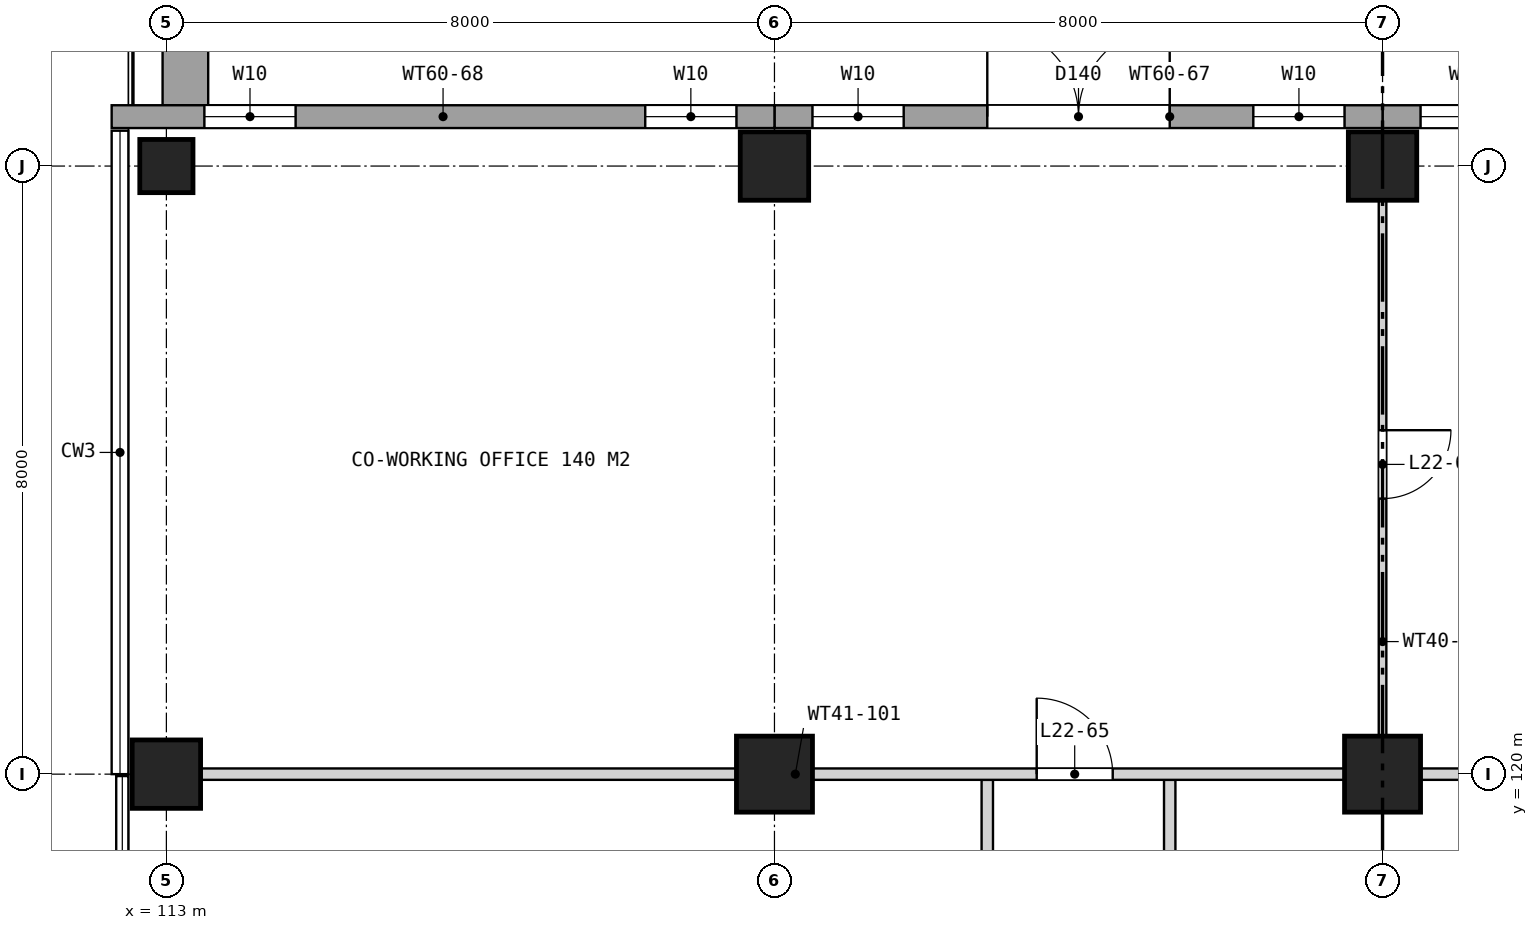
"""IFC4 building model, lengths in metres.
Left out: names, types, materials, properties, quantities, classifications, styles, units other than length and angle.
Written with IfcOpenShell. Run it as: python <this file> out.ifc"""

import sys

from ifc_helpers import new_model, si_unit, direction, frame, frame_2d, origin, origin_2d, place, context, subcontext, project, spatial, rectangle, extrude, element, fill, save


model = new_model("IFC4")
c1 = context("Model", 3, precision=1e-05, world=origin(), true_north=direction((0.0, 1.0)))
c2 = subcontext(c1, "Body", "Model", "MODEL_VIEW")
j1 = project(units=[si_unit("LENGTHUNIT", "METRE"), si_unit("PLANEANGLEUNIT", "RADIAN")], contexts=[c1])
p1 = place(None, origin())
s1 = spatial("IfcSite", under=j1, at=p1, CompositionType="ELEMENT")
p2 = place(p1, origin())
s2 = spatial("IfcBuilding", under=s1, at=p2, CompositionType="ELEMENT")
p3 = place(p2, frame((0.0, 0.0, 112.7)))
s3 = spatial("IfcBuildingStorey", under=s2, at=p3, CompositionType="ELEMENT", Elevation=112.7)
p4 = place(p3, frame((113.0, 120.0, 0.0), z_axis=(0.0, 0.0, 1.0), x_axis=(1.0, 0.0, 0.0)))
e1 = element("IfcColumn", 1, at=p4, inside=s3, PredefinedType="COLUMN", context=c2, shape_type="SweptSolid", body=[
    extrude(rectangle(XDim=0.9, YDim=0.9, at=origin_2d()), origin(), (0.0, 0.0, 1.0), 4.2),
])
p5 = place(p3, frame((113.0, 128.0, 0.0), z_axis=(0.0, 0.0, 1.0), x_axis=(1.0, 0.0, 0.0)))
e2 = element("IfcColumn", 2, at=p5, inside=s3, PredefinedType="COLUMN", context=c2, shape_type="SweptSolid", body=[
    extrude(rectangle(XDim=0.7, YDim=0.7, at=origin_2d()), origin(), (0.0, 0.0, 1.0), 4.2),
])
p6 = place(p3, frame((121.0, 120.0, 0.0), z_axis=(0.0, 0.0, 1.0), x_axis=(1.0, 0.0, 0.0)))
e3 = element("IfcColumn", 3, at=p6, inside=s3, PredefinedType="COLUMN", context=c2, shape_type="SweptSolid", body=[
    extrude(rectangle(XDim=1.0, YDim=1.0, at=origin_2d()), origin(), (0.0, 0.0, 1.0), 4.2),
])
p7 = place(p3, frame((121.0, 128.0, 0.0), z_axis=(0.0, 0.0, 1.0), x_axis=(1.0, 0.0, 0.0)))
e4 = element("IfcColumn", 4, at=p7, inside=s3, PredefinedType="COLUMN", context=c2, shape_type="SweptSolid", body=[
    extrude(rectangle(XDim=0.9, YDim=0.9, at=origin_2d()), origin(), (0.0, 0.0, 1.0), 4.2),
])
p8 = place(p3, frame((129.0, 120.0, 0.0), z_axis=(0.0, 0.0, 1.0), x_axis=(1.0, 0.0, 0.0)))
e5 = element("IfcColumn", 5, at=p8, inside=s3, PredefinedType="COLUMN", context=c2, shape_type="SweptSolid", body=[
    extrude(rectangle(XDim=1.0, YDim=1.0, at=origin_2d()), origin(), (0.0, 0.0, 1.0), 4.2),
])
p9 = place(p3, frame((129.0, 128.0, 0.0), z_axis=(0.0, 0.0, 1.0), x_axis=(1.0, 0.0, 0.0)))
e6 = element("IfcColumn", 6, at=p9, inside=s3, PredefinedType="COLUMN", context=c2, shape_type="SweptSolid", body=[
    extrude(rectangle(XDim=0.9, YDim=0.9, at=origin_2d()), origin(), (0.0, 0.0, 1.0), 4.2),
])
p10 = place(p3, frame((113.25, 128.8, 0.0), z_axis=(0.0, 0.0, 1.0), x_axis=(0.0, 1.0, 0.0)))
e7 = element("IfcWall", 7, at=p10, inside=s3, PredefinedType="SOLIDWALL", context=c2, shape_type="SweptSolid", body=[
    extrude(rectangle(XDim=7.25, YDim=0.6, at=frame_2d((3.625, 0.0))), origin(), (0.0, 0.0, 1.0), 0.6),
])
p11 = place(p3, frame((137.5, 128.65, 0.0), z_axis=(0.0, 0.0, 1.0), x_axis=(-1.0, 0.0, 0.0)))
e8 = element("IfcWall", 8, at=p11, inside=s3, PredefinedType="SOLIDWALL", context=c2, shape_type="SweptSolid", body=[
    extrude(rectangle(XDim=8.5, YDim=0.3, at=frame_2d((4.25, 0.0))), origin(), (0.0, 0.0, 1.0), 3.447),
])
p12 = place(p11, frame((1.0, 0.0, 0.4)))
e9 = element("IfcOpeningElement", 9, at=p12, cuts=e8, PredefinedType="OPENING", context=c2, shape_type="SweptSolid", body=[
    extrude(rectangle(XDim=1.2, YDim=2.2, at=frame_2d((0.6, 1.1))), frame((0.0, 0.16, 0.0), z_axis=(0.0, -1.0, 0.0), x_axis=(1.0, 0.0, 0.0)), (0.0, 0.0, 1.0), 0.32),
])
p13 = place(p11, frame((6.8, 0.0, 0.4)))
e10 = element("IfcOpeningElement", 10, at=p13, cuts=e8, PredefinedType="OPENING", context=c2, shape_type="SweptSolid", body=[
    extrude(rectangle(XDim=1.2, YDim=2.2, at=frame_2d((0.6, 1.1))), frame((0.0, 0.16, 0.0), z_axis=(0.0, -1.0, 0.0), x_axis=(1.0, 0.0, 0.0)), (0.0, 0.0, 1.0), 0.32),
])
p14 = place(p3, frame((129.0, 128.65, 0.0), z_axis=(0.0, 0.0, 1.0), x_axis=(-1.0, 0.0, 0.0)))
e11 = element("IfcWall", 11, at=p14, inside=s3, PredefinedType="SOLIDWALL", context=c2, shape_type="SweptSolid", body=[
    extrude(rectangle(XDim=8.0, YDim=0.3, at=frame_2d((4.0, 0.0))), origin(), (0.0, 0.0, 1.0), 3.447),
])
p15 = place(p14, frame((2.8, 0.0, 0.0)))
e12 = element("IfcOpeningElement", 12, at=p15, cuts=e11, PredefinedType="OPENING", context=c2, shape_type="SweptSolid", body=[
    extrude(rectangle(XDim=2.4, YDim=2.4, at=frame_2d((1.2, 1.2))), frame((0.0, 0.16, 0.0), z_axis=(0.0, -1.0, 0.0), x_axis=(1.0, 0.0, 0.0)), (0.0, 0.0, 1.0), 0.32),
])
p16 = place(p14, frame((0.5, 0.0, 0.4)))
e13 = element("IfcOpeningElement", 13, at=p16, cuts=e11, PredefinedType="OPENING", context=c2, shape_type="SweptSolid", body=[
    extrude(rectangle(XDim=1.2, YDim=2.2, at=frame_2d((0.6, 1.1))), frame((0.0, 0.16, 0.0), z_axis=(0.0, -1.0, 0.0), x_axis=(1.0, 0.0, 0.0)), (0.0, 0.0, 1.0), 0.32),
])
p17 = place(p14, frame((6.3, 0.0, 0.4)))
e14 = element("IfcOpeningElement", 14, at=p17, cuts=e11, PredefinedType="OPENING", context=c2, shape_type="SweptSolid", body=[
    extrude(rectangle(XDim=1.2, YDim=2.2, at=frame_2d((0.6, 1.1))), frame((0.0, 0.16, 0.0), z_axis=(0.0, -1.0, 0.0), x_axis=(1.0, 0.0, 0.0)), (0.0, 0.0, 1.0), 0.32),
])
p18 = place(p3, frame((121.0, 128.65, 0.0), z_axis=(0.0, 0.0, 1.0), x_axis=(-1.0, 0.0, 0.0)))
e15 = element("IfcWall", 15, at=p18, inside=s3, PredefinedType="SOLIDWALL", context=c2, shape_type="SweptSolid", body=[
    extrude(rectangle(XDim=8.72, YDim=0.3, at=frame_2d((4.36, 0.0))), origin(), (0.0, 0.0, 1.0), 3.447),
])
p19 = place(p18, frame((0.5, 0.0, 0.4)))
e16 = element("IfcOpeningElement", 16, at=p19, cuts=e15, PredefinedType="OPENING", context=c2, shape_type="SweptSolid", body=[
    extrude(rectangle(XDim=1.2, YDim=2.2, at=frame_2d((0.6, 1.1))), frame((0.0, 0.16, 0.0), z_axis=(0.0, -1.0, 0.0), x_axis=(1.0, 0.0, 0.0)), (0.0, 0.0, 1.0), 0.32),
])
p20 = place(p18, frame((6.3, 0.0, 0.4)))
e17 = element("IfcOpeningElement", 17, at=p20, cuts=e15, PredefinedType="OPENING", context=c2, shape_type="SweptSolid", body=[
    extrude(rectangle(XDim=1.2, YDim=2.2, at=frame_2d((0.6, 1.1))), frame((0.0, 0.16, 0.0), z_axis=(0.0, -1.0, 0.0), x_axis=(1.0, 0.0, 0.0)), (0.0, 0.0, 1.0), 0.32),
])
p21 = place(p3, frame((123.8, 101.2, 0.0), z_axis=(0.0, 0.0, 1.0), x_axis=(0.0, 1.0, 0.0)))
e18 = element("IfcWall", 18, at=p21, inside=s3, PredefinedType="PARTITIONING", context=c2, shape_type="SweptSolid", body=[
    extrude(rectangle(XDim=18.725, YDim=0.15, at=frame_2d((9.363, 0.0))), origin(), (0.0, 0.0, 1.0), 3.437),
])
p22 = place(p21, frame((0.75, 0.0, 0.0)))
e19 = element("IfcOpeningElement", 19, at=p22, cuts=e18, PredefinedType="OPENING", context=c2, shape_type="SweptSolid", body=[
    extrude(rectangle(XDim=1.0, YDim=2.1, at=frame_2d((0.5, 1.05))), frame((0.0, 0.085, 0.0), z_axis=(0.0, -1.0, 0.0), x_axis=(1.0, 0.0, 0.0)), (0.0, 0.0, 1.0), 0.17),
])
p23 = place(p21, frame((3.05, 0.0, 0.0)))
e20 = element("IfcOpeningElement", 20, at=p23, cuts=e18, PredefinedType="OPENING", context=c2, shape_type="SweptSolid", body=[
    extrude(rectangle(XDim=1.0, YDim=2.1, at=frame_2d((0.5, 1.05))), frame((0.0, 0.085, 0.0), z_axis=(0.0, -1.0, 0.0), x_axis=(1.0, 0.0, 0.0)), (0.0, 0.0, 1.0), 0.17),
])
p24 = place(p21, frame((7.35, 0.0, 0.0)))
e21 = element("IfcOpeningElement", 21, at=p24, cuts=e18, PredefinedType="OPENING", context=c2, shape_type="SweptSolid", body=[
    extrude(rectangle(XDim=1.0, YDim=2.1, at=frame_2d((0.5, 1.05))), frame((0.0, 0.085, 0.0), z_axis=(0.0, -1.0, 0.0), x_axis=(1.0, 0.0, 0.0)), (0.0, 0.0, 1.0), 0.17),
])
p25 = place(p21, frame((14.25, 0.0, 0.0)))
e22 = element("IfcOpeningElement", 22, at=p25, cuts=e18, PredefinedType="OPENING", context=c2, shape_type="SweptSolid", body=[
    extrude(rectangle(XDim=1.0, YDim=2.1, at=frame_2d((0.5, 1.05))), frame((0.0, 0.085, 0.0), z_axis=(0.0, -1.0, 0.0), x_axis=(1.0, 0.0, 0.0)), (0.0, 0.0, 1.0), 0.17),
])
p26 = place(p3, frame((126.2, 101.2, 0.0), z_axis=(0.0, 0.0, 1.0), x_axis=(0.0, 1.0, 0.0)))
e23 = element("IfcWall", 23, at=p26, inside=s3, PredefinedType="PARTITIONING", context=c2, shape_type="SweptSolid", body=[
    extrude(rectangle(XDim=18.725, YDim=0.15, at=frame_2d((9.363, 0.0))), origin(), (0.0, 0.0, 1.0), 3.437),
])
p27 = place(p26, frame((0.75, 0.0, 0.0)))
e24 = element("IfcOpeningElement", 24, at=p27, cuts=e23, PredefinedType="OPENING", context=c2, shape_type="SweptSolid", body=[
    extrude(rectangle(XDim=1.0, YDim=2.1, at=frame_2d((0.5, 1.05))), frame((0.0, 0.085, 0.0), z_axis=(0.0, -1.0, 0.0), x_axis=(1.0, 0.0, 0.0)), (0.0, 0.0, 1.0), 0.17),
])
p28 = place(p26, frame((3.05, 0.0, 0.0)))
e25 = element("IfcOpeningElement", 25, at=p28, cuts=e23, PredefinedType="OPENING", context=c2, shape_type="SweptSolid", body=[
    extrude(rectangle(XDim=1.0, YDim=2.1, at=frame_2d((0.5, 1.05))), frame((0.0, 0.085, 0.0), z_axis=(0.0, -1.0, 0.0), x_axis=(1.0, 0.0, 0.0)), (0.0, 0.0, 1.0), 0.17),
])
p29 = place(p26, frame((10.85, 0.0, 0.0)))
e26 = element("IfcOpeningElement", 26, at=p29, cuts=e23, PredefinedType="OPENING", context=c2, shape_type="SweptSolid", body=[
    extrude(rectangle(XDim=1.8, YDim=2.1, at=frame_2d((0.9, 1.05))), frame((0.0, 0.085, 0.0), z_axis=(0.0, -1.0, 0.0), x_axis=(1.0, 0.0, 0.0)), (0.0, 0.0, 1.0), 0.17),
])
p30 = place(p3, frame((129.0, 120.075, 0.0), z_axis=(0.0, 0.0, 1.0), x_axis=(0.0, 1.0, 0.0)))
e27 = element("IfcWall", 27, at=p30, inside=s3, PredefinedType="PARTITIONING", context=c2, shape_type="SweptSolid", body=[
    extrude(rectangle(XDim=8.345, YDim=0.1, at=frame_2d((4.172, 0.0))), origin(), (0.0, 0.0, 1.0), 3.437),
])
p31 = place(p30, frame((3.55, 0.0, 0.0)))
e28 = element("IfcOpeningElement", 28, at=p31, cuts=e27, PredefinedType="OPENING", context=c2, shape_type="SweptSolid", body=[
    extrude(rectangle(XDim=0.9, YDim=2.1, at=frame_2d((0.45, 1.05))), frame((0.0, 0.06, 0.0), z_axis=(0.0, -1.0, 0.0), x_axis=(1.0, 0.0, 0.0)), (0.0, 0.0, 1.0), 0.12),
])
p32 = place(p3, frame((112.58, 120.0, 0.0), z_axis=(0.0, 0.0, 1.0), x_axis=(1.0, 0.0, 0.0)))
e29 = element("IfcWall", 29, at=p32, inside=s3, PredefinedType="PARTITIONING", context=c2, shape_type="SweptSolid", body=[
    extrude(rectangle(XDim=24.84, YDim=0.15, at=frame_2d((12.42, 0.0))), origin(), (0.0, 0.0, 1.0), 3.437),
])
p33 = place(p32, frame((11.87, 0.0, 0.0)))
e30 = element("IfcOpeningElement", 30, at=p33, cuts=e29, PredefinedType="OPENING", context=c2, shape_type="SweptSolid", body=[
    extrude(rectangle(XDim=1.0, YDim=2.1, at=frame_2d((0.5, 1.05))), frame((0.0, 0.085, 0.0), z_axis=(0.0, -1.0, 0.0), x_axis=(1.0, 0.0, 0.0)), (0.0, 0.0, 1.0), 0.17),
])
p34 = place(p13, origin())
e31 = element("IfcWindow", 31, at=p34, inside=s3, PartitioningType="SINGLE_PANEL", PredefinedType="WINDOW", context=c2, shape_type="SweptSolid", body=[
    extrude(rectangle(XDim=1.2, YDim=2.2, at=frame_2d((0.6, 1.1))), frame((0.0, 0.03, 0.0), z_axis=(0.0, -1.0, 0.0), x_axis=(1.0, 0.0, 0.0)), (0.0, 0.0, 1.0), 0.06),
])
fill(e10, e31)
p35 = place(p15, frame((2.4, 0.0, 0.0), z_axis=(0.0, 0.0, 1.0), x_axis=(-1.0, 0.0, 0.0)))
e32 = element("IfcDoor", 32, at=p35, inside=s3, OperationType="DOUBLE_DOOR_SINGLE_SWING", PredefinedType="DOOR", context=c2, shape_type="SweptSolid", body=[
    extrude(rectangle(XDim=2.4, YDim=2.4, at=frame_2d((1.2, 1.2))), frame((0.0, 0.025, 0.0), z_axis=(0.0, -1.0, 0.0), x_axis=(1.0, 0.0, 0.0)), (0.0, 0.0, 1.0), 0.05),
])
fill(e12, e32)
p36 = place(p16, origin())
e33 = element("IfcWindow", 33, at=p36, inside=s3, PartitioningType="SINGLE_PANEL", PredefinedType="WINDOW", context=c2, shape_type="SweptSolid", body=[
    extrude(rectangle(XDim=1.2, YDim=2.2, at=frame_2d((0.6, 1.1))), frame((0.0, 0.03, 0.0), z_axis=(0.0, -1.0, 0.0), x_axis=(1.0, 0.0, 0.0)), (0.0, 0.0, 1.0), 0.06),
])
fill(e13, e33)
p37 = place(p17, origin())
e34 = element("IfcWindow", 34, at=p37, inside=s3, PartitioningType="SINGLE_PANEL", PredefinedType="WINDOW", context=c2, shape_type="SweptSolid", body=[
    extrude(rectangle(XDim=1.2, YDim=2.2, at=frame_2d((0.6, 1.1))), frame((0.0, 0.03, 0.0), z_axis=(0.0, -1.0, 0.0), x_axis=(1.0, 0.0, 0.0)), (0.0, 0.0, 1.0), 0.06),
])
fill(e14, e34)
p38 = place(p19, origin())
e35 = element("IfcWindow", 35, at=p38, inside=s3, PartitioningType="SINGLE_PANEL", PredefinedType="WINDOW", context=c2, shape_type="SweptSolid", body=[
    extrude(rectangle(XDim=1.2, YDim=2.2, at=frame_2d((0.6, 1.1))), frame((0.0, 0.03, 0.0), z_axis=(0.0, -1.0, 0.0), x_axis=(1.0, 0.0, 0.0)), (0.0, 0.0, 1.0), 0.06),
])
fill(e16, e35)
p39 = place(p20, origin())
e36 = element("IfcWindow", 36, at=p39, inside=s3, PartitioningType="SINGLE_PANEL", PredefinedType="WINDOW", context=c2, shape_type="SweptSolid", body=[
    extrude(rectangle(XDim=1.2, YDim=2.2, at=frame_2d((0.6, 1.1))), frame((0.0, 0.03, 0.0), z_axis=(0.0, -1.0, 0.0), x_axis=(1.0, 0.0, 0.0)), (0.0, 0.0, 1.0), 0.06),
])
fill(e17, e36)
p40 = place(p33, origin())
e37 = element("IfcDoor", 37, at=p40, inside=s3, OperationType="SINGLE_SWING_LEFT", PredefinedType="DOOR", context=c2, shape_type="SweptSolid", body=[
    extrude(rectangle(XDim=1.0, YDim=2.1, at=frame_2d((0.5, 1.05))), frame((0.0, 0.025, 0.0), z_axis=(0.0, -1.0, 0.0), x_axis=(1.0, 0.0, 0.0)), (0.0, 0.0, 1.0), 0.05),
])
fill(e30, e37)
p41 = place(p31, frame((0.9, 0.0, 0.0), z_axis=(0.0, 0.0, 1.0), x_axis=(-1.0, 0.0, 0.0)))
e38 = element("IfcDoor", 38, at=p41, inside=s3, OperationType="SINGLE_SWING_LEFT", PredefinedType="DOOR", context=c2, shape_type="SweptSolid", body=[
    extrude(rectangle(XDim=0.9, YDim=2.1, at=frame_2d((0.45, 1.05))), frame((0.0, 0.025, 0.0), z_axis=(0.0, -1.0, 0.0), x_axis=(1.0, 0.0, 0.0)), (0.0, 0.0, 1.0), 0.05),
])
fill(e28, e38)
save(model, sys.argv[1])
